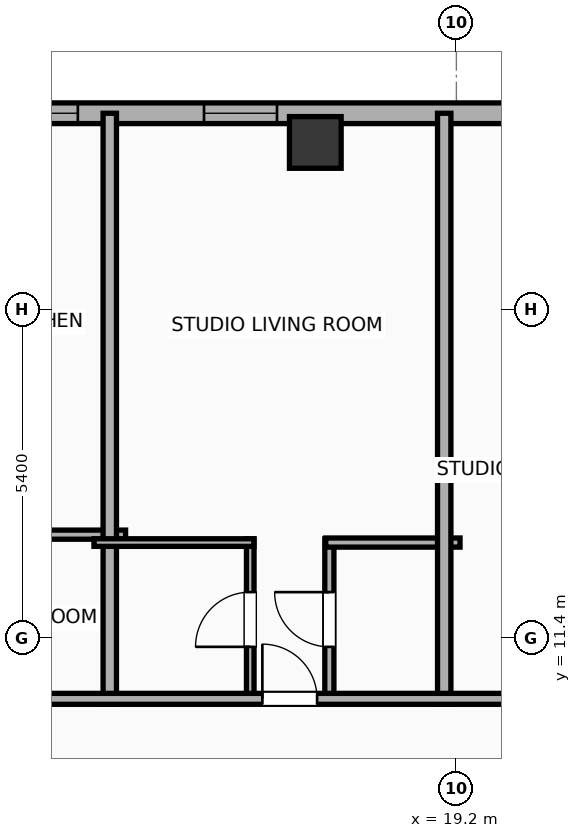
"""IFC4 building model, lengths in metres.
Left out: names, types, materials, properties, quantities, classifications, styles, units other than length and angle.
Written with IfcOpenShell. Run it as: python <this file> out.ifc"""

import sys

from ifc_helpers import new_model, si_unit, direction, frame, frame_2d, origin, origin_2d, place, context, subcontext, project, spatial, rectangle, hollow_rectangle, extrude, element, fill, save


model = new_model("IFC4")
c1 = context("Model", 3, precision=1e-05, world=origin(), true_north=direction((0.0, 1.0)))
c2 = subcontext(c1, "Body", "Model", "MODEL_VIEW")
j1 = project(units=[si_unit("LENGTHUNIT", "METRE"), si_unit("PLANEANGLEUNIT", "RADIAN")], contexts=[c1])
p1 = place(None, origin())
s1 = spatial("IfcSite", under=j1, at=p1, CompositionType="ELEMENT")
p2 = place(p1, origin())
s2 = spatial("IfcBuilding", under=s1, at=p2, CompositionType="ELEMENT")
p3 = place(p2, frame((0.0, 0.0, 208.0)))
s3 = spatial("IfcBuildingStorey", under=s2, at=p3, CompositionType="ELEMENT", Elevation=208.0)
p4 = place(p3, frame((16.88, 19.55, 0.0), z_axis=(0.0, 0.0, 1.0), x_axis=(1.0, 0.0, 0.0)))
e1 = element("IfcColumn", 1, at=p4, inside=s3, PredefinedType="COLUMN", context=c2, shape_type="SweptSolid", body=[
    extrude(hollow_rectangle(XDim=0.85, YDim=0.85, WallThickness=0.028, at=origin_2d()), origin(), (0.0, 0.0, 1.0), 3.9),
])
p5 = place(p3, frame((-22.783, 20.03, 0.0), z_axis=(0.0, 0.0, 1.0), x_axis=(1.0, 0.0, 0.0)))
e2 = element("IfcWall", 2, at=p5, inside=s3, PredefinedType="ELEMENTEDWALL", context=c2, shape_type="SweptSolid", body=[
    extrude(rectangle(XDim=49.566, YDim=0.34, at=frame_2d((24.783, 0.0))), origin(), (0.0, 0.0, 1.0), 3.65),
])
p6 = place(p5, frame((25.233, 0.0, 0.75)))
e3 = element("IfcOpeningElement", 3, at=p6, cuts=e2, PredefinedType="OPENING", context=c2, shape_type="SweptSolid", body=[
    extrude(rectangle(XDim=2.4, YDim=2.1, at=frame_2d((1.2, 1.05))), frame((0.0, 0.18, 0.0), z_axis=(0.0, -1.0, 0.0), x_axis=(1.0, 0.0, 0.0)), (0.0, 0.0, 1.0), 0.36),
])
p7 = place(p5, frame((1.532, 0.0, 0.75)))
e4 = element("IfcOpeningElement", 4, at=p7, cuts=e2, PredefinedType="OPENING", context=c2, shape_type="SweptSolid", body=[
    extrude(rectangle(XDim=1.2, YDim=2.05, at=frame_2d((0.6, 1.025))), frame((0.0, 0.18, 0.0), z_axis=(0.0, -1.0, 0.0), x_axis=(1.0, 0.0, 0.0)), (0.0, 0.0, 1.0), 0.36),
])
p8 = place(p5, frame((4.478, 0.0, 0.75)))
e5 = element("IfcOpeningElement", 5, at=p8, cuts=e2, PredefinedType="OPENING", context=c2, shape_type="SweptSolid", body=[
    extrude(rectangle(XDim=1.2, YDim=2.05, at=frame_2d((0.6, 1.025))), frame((0.0, 0.18, 0.0), z_axis=(0.0, -1.0, 0.0), x_axis=(1.0, 0.0, 0.0)), (0.0, 0.0, 1.0), 0.36),
])
p9 = place(p5, frame((7.983, 0.0, 0.75)))
e6 = element("IfcOpeningElement", 6, at=p9, cuts=e2, PredefinedType="OPENING", context=c2, shape_type="SweptSolid", body=[
    extrude(rectangle(XDim=1.2, YDim=2.05, at=frame_2d((0.6, 1.025))), frame((0.0, 0.18, 0.0), z_axis=(0.0, -1.0, 0.0), x_axis=(1.0, 0.0, 0.0)), (0.0, 0.0, 1.0), 0.36),
])
p10 = place(p5, frame((16.46, 0.0, 0.75)))
e7 = element("IfcOpeningElement", 7, at=p10, cuts=e2, PredefinedType="OPENING", context=c2, shape_type="SweptSolid", body=[
    extrude(rectangle(XDim=1.2, YDim=2.05, at=frame_2d((0.6, 1.025))), frame((0.0, 0.18, 0.0), z_axis=(0.0, -1.0, 0.0), x_axis=(1.0, 0.0, 0.0)), (0.0, 0.0, 1.0), 0.36),
])
p11 = place(p5, frame((13.46, 0.0, 0.75)))
e8 = element("IfcOpeningElement", 8, at=p11, cuts=e2, PredefinedType="OPENING", context=c2, shape_type="SweptSolid", body=[
    extrude(rectangle(XDim=1.2, YDim=2.05, at=frame_2d((0.6, 1.025))), frame((0.0, 0.18, 0.0), z_axis=(0.0, -1.0, 0.0), x_axis=(1.0, 0.0, 0.0)), (0.0, 0.0, 1.0), 0.36),
])
p12 = place(p5, frame((21.183, 0.0, 0.75)))
e9 = element("IfcOpeningElement", 9, at=p12, cuts=e2, PredefinedType="OPENING", context=c2, shape_type="SweptSolid", body=[
    extrude(rectangle(XDim=1.2, YDim=2.05, at=frame_2d((0.6, 1.025))), frame((0.0, 0.18, 0.0), z_axis=(0.0, -1.0, 0.0), x_axis=(1.0, 0.0, 0.0)), (0.0, 0.0, 1.0), 0.36),
])
p13 = place(p5, frame((31.808, 0.0, 0.75)))
e10 = element("IfcOpeningElement", 10, at=p13, cuts=e2, PredefinedType="OPENING", context=c2, shape_type="SweptSolid", body=[
    extrude(rectangle(XDim=1.2, YDim=2.05, at=frame_2d((0.6, 1.025))), frame((0.0, 0.18, 0.0), z_axis=(0.0, -1.0, 0.0), x_axis=(1.0, 0.0, 0.0)), (0.0, 0.0, 1.0), 0.36),
])
p14 = place(p5, frame((34.558, 0.0, 0.75)))
e11 = element("IfcOpeningElement", 11, at=p14, cuts=e2, PredefinedType="OPENING", context=c2, shape_type="SweptSolid", body=[
    extrude(rectangle(XDim=1.2, YDim=2.05, at=frame_2d((0.6, 1.025))), frame((0.0, 0.18, 0.0), z_axis=(0.0, -1.0, 0.0), x_axis=(1.0, 0.0, 0.0)), (0.0, 0.0, 1.0), 0.36),
])
p15 = place(p5, frame((37.833, 0.0, 0.75)))
e12 = element("IfcOpeningElement", 12, at=p15, cuts=e2, PredefinedType="OPENING", context=c2, shape_type="SweptSolid", body=[
    extrude(rectangle(XDim=1.2, YDim=2.05, at=frame_2d((0.6, 1.025))), frame((0.0, 0.18, 0.0), z_axis=(0.0, -1.0, 0.0), x_axis=(1.0, 0.0, 0.0)), (0.0, 0.0, 1.0), 0.36),
])
p16 = place(p5, frame((42.797, 0.0, 0.75)))
e13 = element("IfcOpeningElement", 13, at=p16, cuts=e2, PredefinedType="OPENING", context=c2, shape_type="SweptSolid", body=[
    extrude(rectangle(XDim=1.2, YDim=2.05, at=frame_2d((0.6, 1.025))), frame((0.0, 0.18, 0.0), z_axis=(0.0, -1.0, 0.0), x_axis=(1.0, 0.0, 0.0)), (0.0, 0.0, 1.0), 0.36),
])
p17 = place(p5, frame((45.606, 0.0, 0.75)))
e14 = element("IfcOpeningElement", 14, at=p17, cuts=e2, PredefinedType="OPENING", context=c2, shape_type="SweptSolid", body=[
    extrude(rectangle(XDim=1.2, YDim=2.05, at=frame_2d((0.6, 1.025))), frame((0.0, 0.18, 0.0), z_axis=(0.0, -1.0, 0.0), x_axis=(1.0, 0.0, 0.0)), (0.0, 0.0, 1.0), 0.36),
])
p18 = place(p5, frame((47.679, 0.0, 0.75)))
e15 = element("IfcOpeningElement", 15, at=p18, cuts=e2, PredefinedType="OPENING", context=c2, shape_type="SweptSolid", body=[
    extrude(rectangle(XDim=1.2, YDim=2.05, at=frame_2d((0.6, 1.025))), frame((0.0, 0.18, 0.0), z_axis=(0.0, -1.0, 0.0), x_axis=(1.0, 0.0, 0.0)), (0.0, 0.0, 1.0), 0.36),
])
p19 = place(p3, frame((11.17, 13.1, 0.0), z_axis=(0.0, 0.0, 1.0), x_axis=(1.0, 0.0, 0.0)))
e16 = element("IfcWall", 16, at=p19, inside=s3, PredefinedType="PLUMBINGWALL", context=c2, shape_type="SweptSolid", body=[
    extrude(rectangle(XDim=2.59, YDim=0.15, at=frame_2d((1.295, 0.0))), origin(), (0.0, 0.0, 1.0), 3.65),
])
p20 = place(p3, frame((13.5, 10.32, 0.0), z_axis=(0.0, 0.0, 1.0), x_axis=(0.0, 1.0, 0.0)))
e17 = element("IfcWall", 17, at=p20, inside=s3, PredefinedType="PARTITIONING", context=c2, shape_type="SweptSolid", body=[
    extrude(rectangle(XDim=9.71, YDim=0.22, at=frame_2d((4.855, 0.0))), origin(), (0.0, 0.0, 1.0), 3.65),
])
p21 = place(p3, frame((15.81, 10.38, 0.0), z_axis=(0.0, 0.0, 1.0), x_axis=(0.0, 1.0, 0.0)))
e18 = element("IfcWall", 18, at=p21, inside=s3, PredefinedType="PARTITIONING", context=c2, shape_type="SweptSolid", body=[
    extrude(rectangle(XDim=2.65, YDim=0.125, at=frame_2d((1.325, 0.0))), origin(), (0.0, 0.0, 1.0), 3.09),
])
p22 = place(p21, frame((0.875, 0.0, 0.0)))
e19 = element("IfcOpeningElement", 19, at=p22, cuts=e18, PredefinedType="OPENING", context=c2, shape_type="SweptSolid", body=[
    extrude(rectangle(XDim=0.9, YDim=2.05, at=frame_2d((0.45, 1.025))), frame((0.0, 0.073, 0.0), z_axis=(0.0, -1.0, 0.0), x_axis=(1.0, 0.0, 0.0)), (0.0, 0.0, 1.0), 0.145),
])
p23 = place(p3, frame((17.111, 10.38, 0.0), z_axis=(0.0, 0.0, 1.0), x_axis=(0.0, 1.0, 0.0)))
e20 = element("IfcWall", 20, at=p23, inside=s3, PredefinedType="PLUMBINGWALL", context=c2, shape_type="SweptSolid", body=[
    extrude(rectangle(XDim=2.65, YDim=0.15, at=frame_2d((1.325, 0.0))), origin(), (0.0, 0.0, 1.0), 3.65),
])
p24 = place(p23, frame((0.875, 0.0, 0.0)))
e21 = element("IfcOpeningElement", 21, at=p24, cuts=e20, PredefinedType="OPENING", context=c2, shape_type="SweptSolid", body=[
    extrude(rectangle(XDim=0.9, YDim=2.05, at=frame_2d((0.45, 1.025))), frame((0.0, 0.085, 0.0), z_axis=(0.0, -1.0, 0.0), x_axis=(1.0, 0.0, 0.0)), (0.0, 0.0, 1.0), 0.17),
])
p25 = place(p3, frame((13.24, 12.97, 0.0), z_axis=(0.0, 0.0, 1.0), x_axis=(1.0, 0.0, 0.0)))
e22 = element("IfcWall", 22, at=p25, inside=s3, PredefinedType="PARTITIONING", context=c2, shape_type="SweptSolid", body=[
    extrude(rectangle(XDim=2.63, YDim=0.125, at=frame_2d((1.315, 0.0))), origin(), (0.0, 0.0, 1.0), 3.65),
])
p26 = place(p3, frame((17.051, 12.97, 0.0), z_axis=(0.0, 0.0, 1.0), x_axis=(1.0, 0.0, 0.0)))
e23 = element("IfcWall", 23, at=p26, inside=s3, PredefinedType="PLUMBINGWALL", context=c2, shape_type="SweptSolid", body=[
    extrude(rectangle(XDim=2.209, YDim=0.15, at=frame_2d((1.104, 0.0))), origin(), (0.0, 0.0, 1.0), 3.65),
])
p27 = place(p3, frame((19.0, 10.32, 0.0), z_axis=(0.0, 0.0, 1.0), x_axis=(0.0, 1.0, 0.0)))
e24 = element("IfcWall", 24, at=p27, inside=s3, PredefinedType="PARTITIONING", context=c2, shape_type="SweptSolid", body=[
    extrude(rectangle(XDim=9.71, YDim=0.22, at=frame_2d((4.855, 0.0))), origin(), (0.0, 0.0, 1.0), 3.65),
])
p28 = place(p3, frame((-26.23, 10.4, 0.0), z_axis=(0.0, 0.0, 1.0), x_axis=(1.0, 0.0, 0.0)))
e25 = element("IfcWall", 25, at=p28, inside=s3, PredefinedType="PARTITIONING", context=c2, shape_type="SweptSolid", body=[
    extrude(rectangle(XDim=56.46, YDim=0.18, at=frame_2d((28.23, 0.0))), origin(), (0.0, 0.0, 1.0), 3.65),
])
p29 = place(p28, frame((4.919, 0.0, 0.0)))
e26 = element("IfcOpeningElement", 26, at=p29, cuts=e25, PredefinedType="OPENING", context=c2, shape_type="SweptSolid", body=[
    extrude(rectangle(XDim=1.15, YDim=2.05, at=frame_2d((0.575, 1.025))), frame((0.0, 0.1, 0.0), z_axis=(0.0, -1.0, 0.0), x_axis=(1.0, 0.0, 0.0)), (0.0, 0.0, 1.0), 0.2),
])
p30 = place(p28, frame((12.903, 0.0, 0.0)))
e27 = element("IfcOpeningElement", 27, at=p30, cuts=e25, PredefinedType="OPENING", context=c2, shape_type="SweptSolid", body=[
    extrude(rectangle(XDim=0.9, YDim=2.05, at=frame_2d((0.45, 1.025))), frame((0.0, 0.1, 0.0), z_axis=(0.0, -1.0, 0.0), x_axis=(1.0, 0.0, 0.0)), (0.0, 0.0, 1.0), 0.2),
])
p31 = place(p28, frame((19.903, 0.0, 0.0)))
e28 = element("IfcOpeningElement", 28, at=p31, cuts=e25, PredefinedType="OPENING", context=c2, shape_type="SweptSolid", body=[
    extrude(rectangle(XDim=1.15, YDim=2.05, at=frame_2d((0.575, 1.025))), frame((0.0, 0.1, 0.0), z_axis=(0.0, -1.0, 0.0), x_axis=(1.0, 0.0, 0.0)), (0.0, 0.0, 1.0), 0.2),
])
p32 = place(p28, frame((24.906, 0.0, 0.0)))
e29 = element("IfcOpeningElement", 29, at=p32, cuts=e25, PredefinedType="OPENING", context=c2, shape_type="SweptSolid", body=[
    extrude(rectangle(XDim=0.9, YDim=2.05, at=frame_2d((0.45, 1.025))), frame((0.0, 0.1, 0.0), z_axis=(0.0, -1.0, 0.0), x_axis=(1.0, 0.0, 0.0)), (0.0, 0.0, 1.0), 0.2),
])
p33 = place(p28, frame((30.908, 0.0, 0.0)))
e30 = element("IfcOpeningElement", 30, at=p33, cuts=e25, PredefinedType="OPENING", context=c2, shape_type="SweptSolid", body=[
    extrude(rectangle(XDim=0.9, YDim=2.05, at=frame_2d((0.45, 1.025))), frame((0.0, 0.1, 0.0), z_axis=(0.0, -1.0, 0.0), x_axis=(1.0, 0.0, 0.0)), (0.0, 0.0, 1.0), 0.2),
])
p34 = place(p28, frame((35.311, 0.0, 0.0)))
e31 = element("IfcOpeningElement", 31, at=p34, cuts=e25, PredefinedType="OPENING", context=c2, shape_type="SweptSolid", body=[
    extrude(rectangle(XDim=1.15, YDim=2.05, at=frame_2d((0.575, 1.025))), frame((0.0, 0.1, 0.0), z_axis=(0.0, -1.0, 0.0), x_axis=(1.0, 0.0, 0.0)), (0.0, 0.0, 1.0), 0.2),
])
p35 = place(p28, frame((42.24, 0.0, 0.0)))
e32 = element("IfcOpeningElement", 32, at=p35, cuts=e25, PredefinedType="OPENING", context=c2, shape_type="SweptSolid", body=[
    extrude(rectangle(XDim=0.9, YDim=2.05, at=frame_2d((0.45, 1.025))), frame((0.0, 0.1, 0.0), z_axis=(0.0, -1.0, 0.0), x_axis=(1.0, 0.0, 0.0)), (0.0, 0.0, 1.0), 0.2),
])
p36 = place(p28, frame((46.298, 0.0, 0.0)))
e33 = element("IfcOpeningElement", 33, at=p36, cuts=e25, PredefinedType="OPENING", context=c2, shape_type="SweptSolid", body=[
    extrude(rectangle(XDim=1.15, YDim=2.05, at=frame_2d((0.575, 1.025))), frame((0.0, 0.1, 0.0), z_axis=(0.0, -1.0, 0.0), x_axis=(1.0, 0.0, 0.0)), (0.0, 0.0, 1.0), 0.2),
])
p37 = place(p28, frame((53.418, 0.0, 0.0)))
e34 = element("IfcOpeningElement", 34, at=p37, cuts=e25, PredefinedType="OPENING", context=c2, shape_type="SweptSolid", body=[
    extrude(rectangle(XDim=0.9, YDim=2.05, at=frame_2d((0.45, 1.025))), frame((0.0, 0.1, 0.0), z_axis=(0.0, -1.0, 0.0), x_axis=(1.0, 0.0, 0.0)), (0.0, 0.0, 1.0), 0.2),
])
p38 = place(p14, origin())
e35 = element("IfcWindow", 35, at=p38, inside=s3, PartitioningType="SINGLE_PANEL", PredefinedType="WINDOW", context=c2, shape_type="SweptSolid", body=[
    extrude(rectangle(XDim=1.2, YDim=2.05, at=frame_2d((0.6, 1.025))), frame((0.0, 0.03, 0.0), z_axis=(0.0, -1.0, 0.0), x_axis=(1.0, 0.0, 0.0)), (0.0, 0.0, 1.0), 0.06),
])
fill(e11, e35)
p39 = place(p15, origin())
e36 = element("IfcWindow", 36, at=p39, inside=s3, PartitioningType="SINGLE_PANEL", PredefinedType="WINDOW", context=c2, shape_type="SweptSolid", body=[
    extrude(rectangle(XDim=1.2, YDim=2.05, at=frame_2d((0.6, 1.025))), frame((0.0, 0.03, 0.0), z_axis=(0.0, -1.0, 0.0), x_axis=(1.0, 0.0, 0.0)), (0.0, 0.0, 1.0), 0.06),
])
fill(e12, e36)
p40 = place(p22, origin())
e37 = element("IfcDoor", 37, at=p40, inside=s3, OperationType="SINGLE_SWING_LEFT", PredefinedType="DOOR", context=c2, shape_type="SweptSolid", body=[
    extrude(rectangle(XDim=0.9, YDim=2.05, at=frame_2d((0.45, 1.025))), frame((0.0, 0.025, 0.0), z_axis=(0.0, -1.0, 0.0), x_axis=(1.0, 0.0, 0.0)), (0.0, 0.0, 1.0), 0.05),
])
fill(e19, e37)
p41 = place(p24, origin())
e38 = element("IfcDoor", 38, at=p41, inside=s3, OperationType="SINGLE_SWING_RIGHT", PredefinedType="DOOR", context=c2, shape_type="SweptSolid", body=[
    extrude(rectangle(XDim=0.9, YDim=2.05, at=frame_2d((0.45, 1.025))), frame((0.0, 0.025, 0.0), z_axis=(0.0, -1.0, 0.0), x_axis=(1.0, 0.0, 0.0)), (0.0, 0.0, 1.0), 0.05),
])
fill(e21, e38)
p42 = place(p35, origin())
e39 = element("IfcDoor", 39, at=p42, inside=s3, OperationType="SINGLE_SWING_LEFT", PredefinedType="DOOR", context=c2, shape_type="SweptSolid", body=[
    extrude(rectangle(XDim=0.9, YDim=2.05, at=frame_2d((0.45, 1.025))), frame((0.0, 0.025, 0.0), z_axis=(0.0, -1.0, 0.0), x_axis=(1.0, 0.0, 0.0)), (0.0, 0.0, 1.0), 0.05),
])
fill(e32, e39)
save(model, sys.argv[1])
